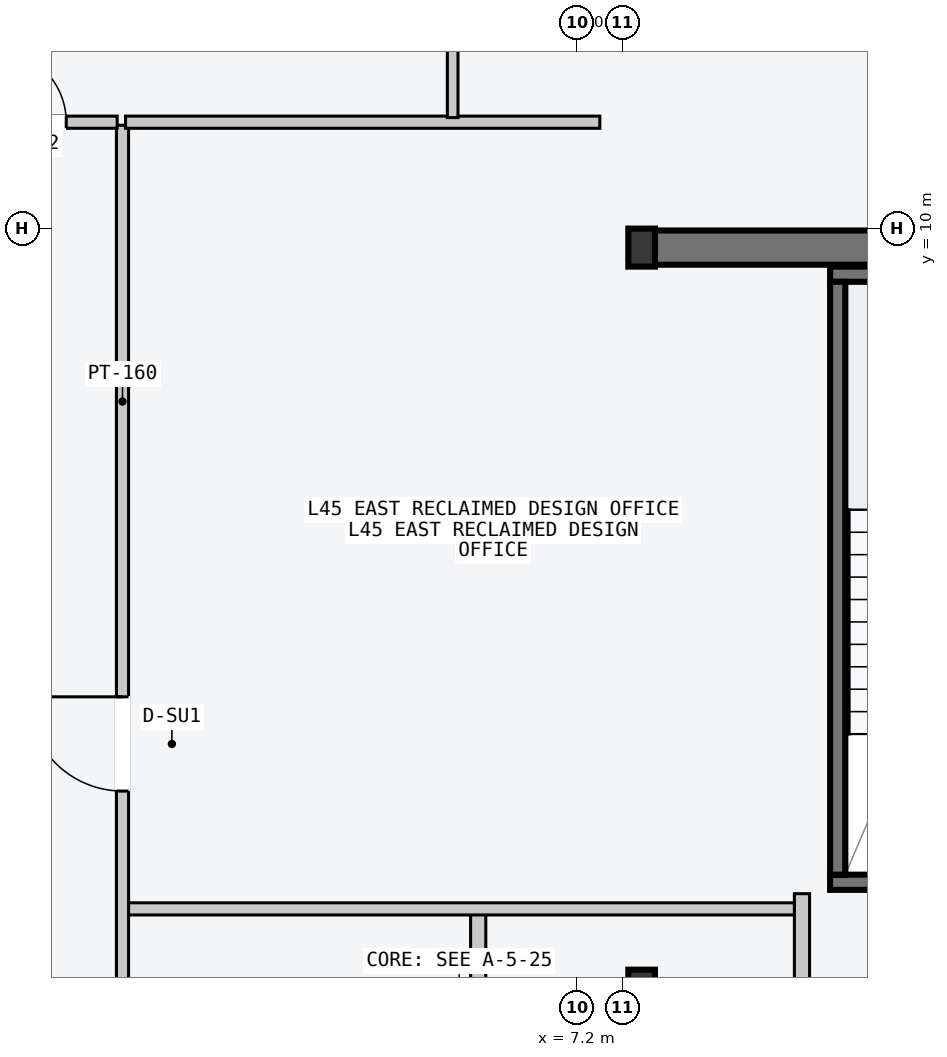
"""IFC4 building model, lengths in metres.
Left out: names, types, materials, properties, quantities, classifications, styles, units other than length and angle.
Written with IfcOpenShell. Run it as: python <this file> out.ifc"""

import sys

from ifc_helpers import new_model, si_unit, direction, frame, frame_2d, origin, origin_2d, place, context, subcontext, project, spatial, rectangle, i_section, extrude, element, fill, save


model = new_model("IFC4")
c1 = context("Model", 3, precision=1e-05, world=origin(), true_north=direction((0.0, 1.0)))
c2 = subcontext(c1, "Body", "Model", "MODEL_VIEW")
j1 = project(units=[si_unit("LENGTHUNIT", "METRE"), si_unit("PLANEANGLEUNIT", "RADIAN")], contexts=[c1])
p1 = place(None, origin())
s1 = spatial("IfcSite", under=j1, at=p1, CompositionType="ELEMENT")
p2 = place(p1, origin())
s2 = spatial("IfcBuilding", under=s1, at=p2, CompositionType="ELEMENT")
p3 = place(p2, frame((0.0, 0.0, 173.1)))
s3 = spatial("IfcBuildingStorey", under=s2, at=p3, CompositionType="ELEMENT", Elevation=173.1)
p4 = place(p3, frame((8.07, 9.75, -0.2), z_axis=(0.0, 0.0, 1.0), x_axis=(1.0, 0.0, 0.0)))
e1 = element("IfcWall", 1, at=p4, inside=s3, PredefinedType="SHEAR", context=c2, shape_type="SweptSolid", body=[
    extrude(rectangle(XDim=6.46, YDim=0.45, at=frame_2d((3.23, 0.0))), origin(), (0.0, 0.0, 1.0), 3.6),
])
p5 = place(p3, frame((10.53, 1.4, -0.2), z_axis=(0.0, 0.0, 1.0), x_axis=(1.0, 0.0, 0.0)))
e2 = element("IfcWall", 2, at=p5, inside=s3, PredefinedType="SOLIDWALL", context=c2, shape_type="SweptSolid", body=[
    extrude(rectangle(XDim=3.72, YDim=0.2, at=frame_2d((1.86, 0.0))), origin(), (0.0, 0.0, 1.0), 3.6),
])
p6 = place(p5, frame((1.5, 0.0, 0.2)))
e3 = element("IfcOpeningElement", 3, at=p6, cuts=e2, PredefinedType="OPENING", context=c2, shape_type="SweptSolid", body=[
    extrude(rectangle(XDim=1.12, YDim=2.18, at=frame_2d((0.56, 1.09))), frame((0.0, 0.11, 0.0), z_axis=(0.0, -1.0, 0.0), x_axis=(1.0, 0.0, 0.0)), (0.0, 0.0, 1.0), 0.22),
])
p7 = place(p3, frame((10.53, 9.4, -0.2), z_axis=(0.0, 0.0, 1.0), x_axis=(1.0, 0.0, 0.0)))
e4 = element("IfcWall", 4, at=p7, inside=s3, PredefinedType="SOLIDWALL", context=c2, shape_type="SweptSolid", body=[
    extrude(rectangle(XDim=3.72, YDim=0.2, at=frame_2d((1.86, 0.0))), origin(), (0.0, 0.0, 1.0), 3.6),
])
p8 = place(p3, frame((10.63, 1.5, -0.2), z_axis=(0.0, 0.0, 1.0), x_axis=(0.0, 1.0, 0.0)))
e5 = element("IfcWall", 5, at=p8, inside=s3, PredefinedType="SOLIDWALL", context=c2, shape_type="SweptSolid", body=[
    extrude(rectangle(XDim=7.8, YDim=0.2, at=frame_2d((3.9, 0.0))), origin(), (0.0, 0.0, 1.0), 3.6),
])
for number, where, z_axis, x_axis in (
    (6, (8.05, 0.0, 0.0), (0.0, 0.0, 1.0), (1.0, 0.0, 0.0)),
    (7, (8.05, 9.75, 0.0), (0.0, 0.0, 1.0), (1.0, 0.0, 0.0)),
):
    element("IfcColumn", number, at=place(p3, frame(where, z_axis=z_axis, x_axis=x_axis)), inside=s3, PredefinedType="COLUMN", context=c2, shape_type="SweptSolid", body=[
        extrude(i_section(OverallWidth=0.35, OverallDepth=0.5, WebThickness=0.02, FlangeThickness=0.032, at=origin_2d()), origin(), (0.0, 0.0, 1.0), 3.6),
    ])
p9 = place(p3, frame((5.9, -9.45, 0.0), z_axis=(0.0, 0.0, 1.0), x_axis=(0.0, 1.0, 0.0)))
e8 = element("IfcWall", 8, at=p9, inside=s3, PredefinedType="PARTITIONING", context=c2, shape_type="SweptSolid", body=[
    extrude(rectangle(XDim=10.5, YDim=0.2, at=frame_2d((5.25, 0.0))), origin(), (0.0, 0.0, 1.0), 3.4),
])
p10 = place(p9, frame((3.9, 0.0, 0.0)))
e9 = element("IfcOpeningElement", 9, at=p10, cuts=e8, PredefinedType="OPENING", context=c2, shape_type="SweptSolid", body=[
    extrude(rectangle(XDim=1.5, YDim=2.2, at=frame_2d((0.75, 1.1))), frame((0.0, 0.11, 0.0), z_axis=(0.0, -1.0, 0.0), x_axis=(1.0, 0.0, 0.0)), (0.0, 0.0, 1.0), 0.22),
])
p11 = place(p3, frame((10.16, -2.55, 0.0), z_axis=(0.0, 0.0, 1.0), x_axis=(0.0, 1.0, 0.0)))
e10 = element("IfcWall", 10, at=p11, inside=s3, PredefinedType="PARTITIONING", context=c2, shape_type="SweptSolid", body=[
    extrude(rectangle(XDim=3.8, YDim=0.2, at=frame_2d((1.9, 0.0))), origin(), (0.0, 0.0, 1.0), 3.4),
])
p12 = place(p11, frame((1.3, 0.0, 0.0)))
e11 = element("IfcOpeningElement", 11, at=p12, cuts=e10, PredefinedType="OPENING", context=c2, shape_type="SweptSolid", body=[
    extrude(rectangle(XDim=1.1, YDim=2.15, at=frame_2d((0.55, 1.075))), frame((0.0, 0.11, 0.0), z_axis=(0.0, -1.0, 0.0), x_axis=(1.0, 0.0, 0.0)), (0.0, 0.0, 1.0), 0.22),
])
p13 = place(p3, frame((1.26, 1.05, 0.0), z_axis=(0.0, 0.0, 1.0), x_axis=(1.0, 0.0, 0.0)))
e12 = element("IfcWall", 12, at=p13, inside=s3, PredefinedType="PARTITIONING", context=c2, shape_type="SweptSolid", body=[
    extrude(rectangle(XDim=8.8, YDim=0.16, at=frame_2d((4.4, 0.0))), origin(), (0.0, 0.0, 1.0), 3.4),
])
p14 = place(p3, frame((1.22, -3.5, 0.0), z_axis=(0.0, 0.0, 1.0), x_axis=(0.0, 1.0, 0.0)))
e13 = element("IfcWall", 13, at=p14, inside=s3, PredefinedType="PARTITIONING", context=c2, shape_type="SweptSolid", body=[
    extrude(rectangle(XDim=14.86, YDim=0.16, at=frame_2d((7.43, 0.0))), origin(), (0.0, 0.0, 1.0), 3.4),
])
p15 = place(p14, frame((6.1, 0.0, 0.0)))
e14 = element("IfcOpeningElement", 14, at=p15, cuts=e13, PredefinedType="OPENING", context=c2, shape_type="SweptSolid", body=[
    extrude(rectangle(XDim=1.24, YDim=2.24, at=frame_2d((0.62, 1.12))), frame((0.0, 0.09, 0.0), z_axis=(0.0, -1.0, 0.0), x_axis=(1.0, 0.0, 0.0)), (0.0, 0.0, 1.0), 0.18),
])
p16 = place(p14, frame((1.6, 0.0, 0.0)))
e15 = element("IfcOpeningElement", 15, at=p16, cuts=e13, PredefinedType="OPENING", context=c2, shape_type="SweptSolid", body=[
    extrude(rectangle(XDim=0.96, YDim=2.18, at=frame_2d((0.48, 1.09))), frame((0.0, 0.09, 0.0), z_axis=(0.0, -1.0, 0.0), x_axis=(1.0, 0.0, 0.0)), (0.0, 0.0, 1.0), 0.18),
])
p17 = place(p3, frame((1.26, 11.4, 0.0), z_axis=(0.0, 0.0, 1.0), x_axis=(1.0, 0.0, 0.0)))
e16 = element("IfcWall", 16, at=p17, inside=s3, PredefinedType="PARTITIONING", context=c2, shape_type="SweptSolid", body=[
    extrude(rectangle(XDim=6.24, YDim=0.16, at=frame_2d((3.12, 0.0))), origin(), (0.0, 0.0, 1.0), 3.4),
])
p18 = place(p3, frame((5.564, 11.46, 0.0), z_axis=(0.0, 0.0, 1.0), x_axis=(0.0, 1.0, 0.0)))
e17 = element("IfcWall", 17, at=p18, inside=s3, PredefinedType="PARTITIONING", context=c2, shape_type="SweptSolid", body=[
    extrude(rectangle(XDim=7.1, YDim=0.14, at=frame_2d((3.55, 0.0))), origin(), (0.0, 0.0, 1.0), 3.4),
])
p19 = place(p18, frame((1.15, 0.0, 0.0)))
e18 = element("IfcOpeningElement", 18, at=p19, cuts=e17, PredefinedType="OPENING", context=c2, shape_type="SweptSolid", body=[
    extrude(rectangle(XDim=0.96, YDim=2.18, at=frame_2d((0.48, 1.09))), frame((0.0, 0.08, 0.0), z_axis=(0.0, -1.0, 0.0), x_axis=(1.0, 0.0, 0.0)), (0.0, 0.0, 1.0), 0.16),
])
p20 = place(p3, frame((-1.15, 11.4, 0.0), z_axis=(0.0, 0.0, 1.0), x_axis=(1.0, 0.0, 0.0)))
e19 = element("IfcWall", 19, at=p20, inside=s3, PredefinedType="PARTITIONING", context=c2, shape_type="SweptSolid", body=[
    extrude(rectangle(XDim=2.3, YDim=0.16, at=frame_2d((1.15, 0.0))), origin(), (0.0, 0.0, 1.0), 3.4),
])
p21 = place(p20, frame((0.67, 0.0, 0.0)))
e20 = element("IfcOpeningElement", 20, at=p21, cuts=e19, PredefinedType="OPENING", context=c2, shape_type="SweptSolid", body=[
    extrude(rectangle(XDim=0.96, YDim=2.18, at=frame_2d((0.48, 1.09))), frame((0.0, 0.09, 0.0), z_axis=(0.0, -1.0, 0.0), x_axis=(1.0, 0.0, 0.0)), (0.0, 0.0, 1.0), 0.18),
])
p22 = place(p15, origin())
e21 = element("IfcDoor", 21, at=p22, inside=s3, OperationType="SINGLE_SWING_RIGHT", PredefinedType="DOOR", context=c2, shape_type="SweptSolid", body=[
    extrude(rectangle(XDim=1.24, YDim=2.24, at=frame_2d((0.62, 1.12))), frame((0.0, 0.025, 0.0), z_axis=(0.0, -1.0, 0.0), x_axis=(1.0, 0.0, 0.0)), (0.0, 0.0, 1.0), 0.05),
])
fill(e14, e21)
p23 = place(p21, origin())
e22 = element("IfcDoor", 22, at=p23, inside=s3, OperationType="SINGLE_SWING_LEFT", PredefinedType="DOOR", context=c2, shape_type="SweptSolid", body=[
    extrude(rectangle(XDim=0.96, YDim=2.18, at=frame_2d((0.48, 1.09))), frame((0.0, 0.025, 0.0), z_axis=(0.0, -1.0, 0.0), x_axis=(1.0, 0.0, 0.0)), (0.0, 0.0, 1.0), 0.05),
])
fill(e20, e22)
save(model, sys.argv[1])
